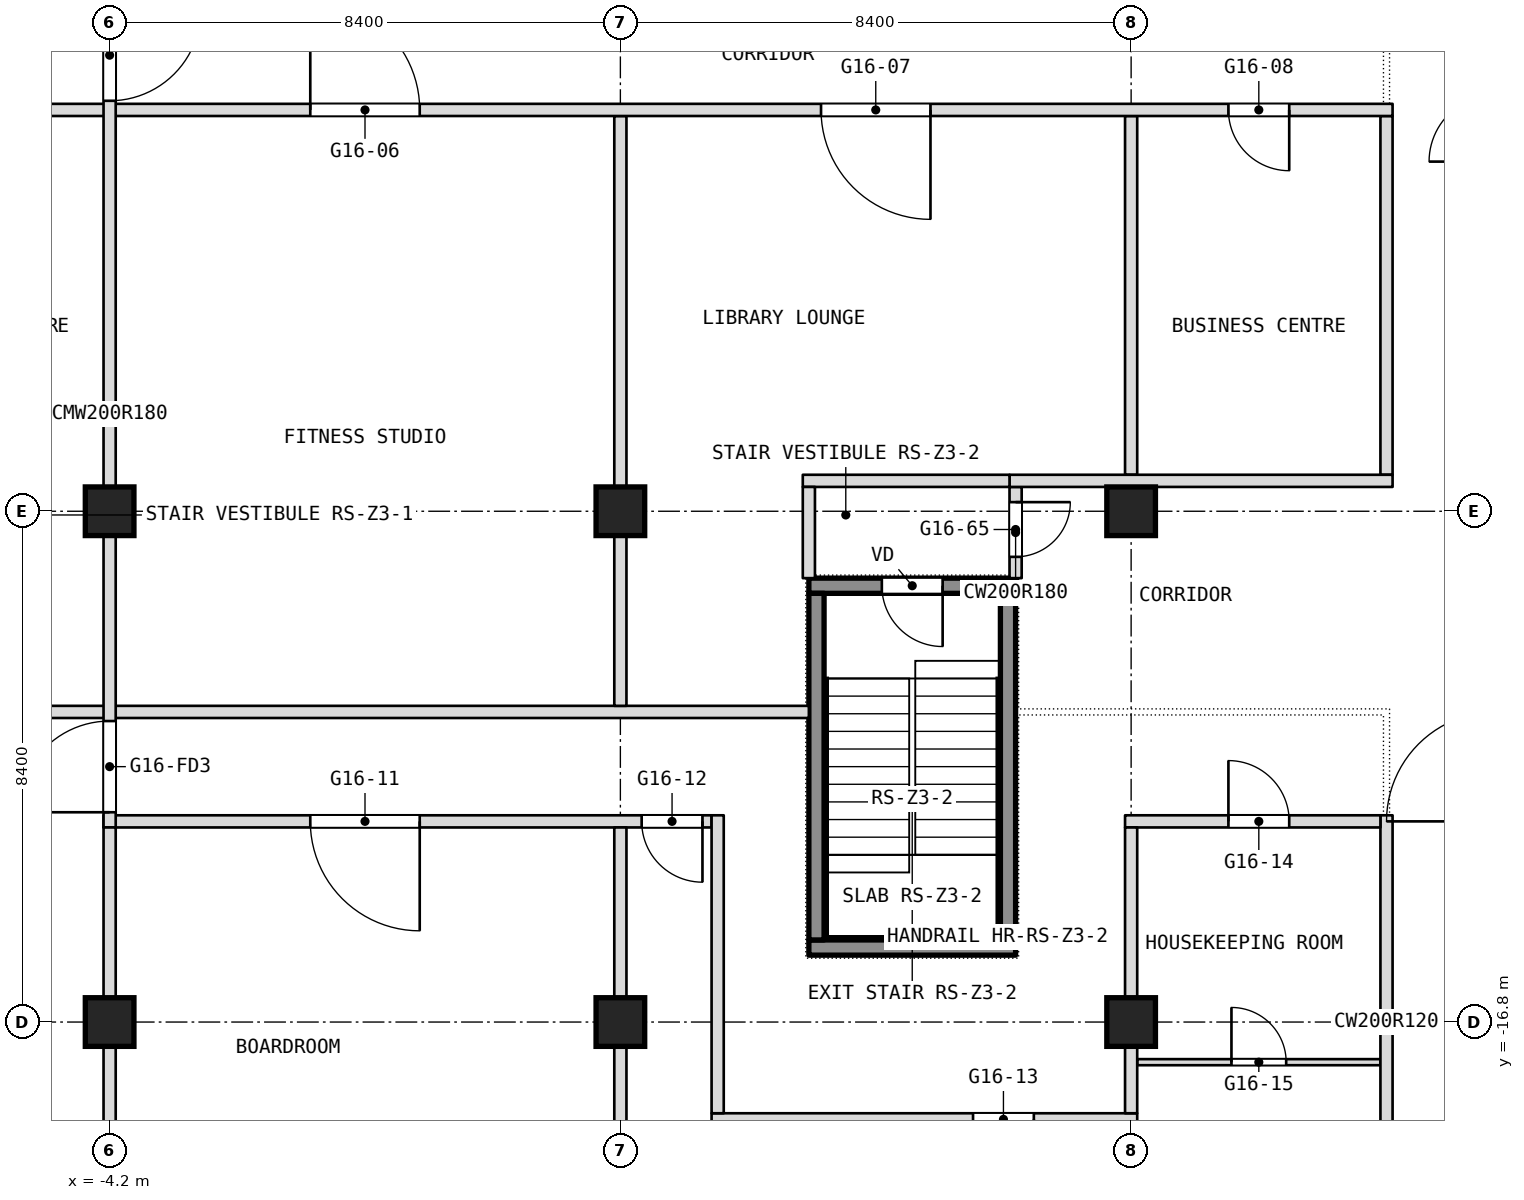
"""IFC4 building model, lengths in metres.
Left out: names, types, materials, properties, quantities, classifications, styles, units other than length and angle.
Written with IfcOpenShell. Run it as: python <this file> out.ifc"""

import sys

from ifc_helpers import new_model, si_unit, direction, frame, frame_2d, origin, origin_2d, place, context, subcontext, project, spatial, rectangle, extrude, element, fill, save


model = new_model("IFC4")
c1 = context("Model", 3, precision=1e-05, world=origin(), true_north=direction((0.0, 1.0)))
c2 = subcontext(c1, "Body", "Model", "MODEL_VIEW")
j1 = project(units=[si_unit("LENGTHUNIT", "METRE"), si_unit("PLANEANGLEUNIT", "RADIAN")], contexts=[c1])
p1 = place(None, origin())
s1 = spatial("IfcSite", under=j1, at=p1, CompositionType="ELEMENT")
p2 = place(p1, origin())
s2 = spatial("IfcBuilding", under=s1, at=p2, CompositionType="ELEMENT")
p3 = place(p2, frame((0.0, 0.0, 202.1)))
s3 = spatial("IfcBuildingStorey", under=s2, at=p3, CompositionType="ELEMENT", Elevation=202.1)
for number, where, z_axis, x_axis in (
    (1, (-4.2, -16.8, 0.0), (0.0, 0.0, 1.0), (1.0, 0.0, 0.0)),
    (2, (-4.2, -8.4, 0.0), (0.0, 0.0, 1.0), (1.0, 0.0, 0.0)),
    (3, (4.2, -16.8, 0.0), (0.0, 0.0, 1.0), (1.0, 0.0, 0.0)),
    (4, (4.2, -8.4, 0.0), (0.0, 0.0, 1.0), (1.0, 0.0, 0.0)),
    (5, (12.6, -16.8, 0.0), (0.0, 0.0, 1.0), (1.0, 0.0, 0.0)),
    (6, (12.6, -8.4, 0.0), (0.0, 0.0, 1.0), (1.0, 0.0, 0.0)),
):
    element("IfcColumn", number, at=place(p3, frame(where, z_axis=z_axis, x_axis=x_axis)), inside=s3, PredefinedType="COLUMN", context=c2, shape_type="SweptSolid", body=[
        extrude(rectangle(XDim=0.8, YDim=0.8, at=origin_2d()), origin(), (0.0, 0.0, 1.0), 3.6),
    ])
p4 = place(p3, frame((5.7, -18.4, 0.0), z_axis=(0.0, 0.0, 1.0), x_axis=(1.0, 0.0, 0.0)))
e7 = element("IfcWall", 7, at=p4, inside=s3, PredefinedType="PARTITIONING", context=c2, shape_type="SweptSolid", body=[
    extrude(rectangle(XDim=7.0, YDim=0.2, at=frame_2d((3.5, 0.0))), origin(), (0.0, 0.0, 1.0), 3.34),
])
p5 = place(p4, frame((4.3, 0.0, 0.0)))
e8 = element("IfcOpeningElement", 8, at=p5, cuts=e7, PredefinedType="OPENING", context=c2, shape_type="SweptSolid", body=[
    extrude(rectangle(XDim=1.0, YDim=2.1, at=frame_2d((0.5, 1.05))), frame((0.0, 0.1, 0.0), z_axis=(0.0, -1.0, 0.0), x_axis=(1.0, 0.0, 0.0)), (0.0, 0.0, 1.0), 0.2),
])
p6 = place(p3, frame((12.7, -17.46, 0.0), z_axis=(0.0, 0.0, 1.0), x_axis=(1.0, 0.0, 0.0)))
e9 = element("IfcWall", 9, at=p6, inside=s3, PredefinedType="PARTITIONING", context=c2, shape_type="SweptSolid", body=[
    extrude(rectangle(XDim=4.0, YDim=0.1, at=frame_2d((2.0, 0.0))), origin(), (0.0, 0.0, 1.0), 3.34),
])
p7 = place(p6, frame((1.55, 0.0, 0.0)))
e10 = element("IfcOpeningElement", 10, at=p7, cuts=e9, PredefinedType="OPENING", context=c2, shape_type="SweptSolid", body=[
    extrude(rectangle(XDim=0.9, YDim=2.1, at=frame_2d((0.45, 1.05))), frame((0.0, 0.05, 0.0), z_axis=(0.0, -1.0, 0.0), x_axis=(1.0, 0.0, 0.0)), (0.0, 0.0, 1.0), 0.1),
])
p8 = place(p3, frame((16.8, -20.2, 0.0), z_axis=(0.0, 0.0, 1.0), x_axis=(0.0, 1.0, 0.0)))
e11 = element("IfcWall", 11, at=p8, inside=s3, PredefinedType="PARTITIONING", context=c2, shape_type="SweptSolid", body=[
    extrude(rectangle(XDim=6.8, YDim=0.2, at=frame_2d((3.4, 0.0))), origin(), (0.0, 0.0, 1.0), 3.34),
])
p9 = place(p3, frame((16.8, -7.8, 0.0), z_axis=(0.0, 0.0, 1.0), x_axis=(0.0, 1.0, 0.0)))
e12 = element("IfcWall", 12, at=p9, inside=s3, PredefinedType="PARTITIONING", context=c2, shape_type="SweptSolid", body=[
    extrude(rectangle(XDim=5.9, YDim=0.2, at=frame_2d((2.95, 0.0))), origin(), (0.0, 0.0, 1.0), 3.34),
])
p10 = place(p3, frame((-4.3, -13.5, 0.0), z_axis=(0.0, 0.0, 1.0), x_axis=(1.0, 0.0, 0.0)))
e13 = element("IfcWall", 13, at=p10, inside=s3, PredefinedType="PARTITIONING", context=c2, shape_type="SweptSolid", body=[
    extrude(rectangle(XDim=10.0, YDim=0.2, at=frame_2d((5.0, 0.0))), origin(), (0.0, 0.0, 1.0), 3.34),
])
p11 = place(p10, frame((3.4, 0.0, 0.0)))
e14 = element("IfcOpeningElement", 14, at=p11, cuts=e13, PredefinedType="OPENING", context=c2, shape_type="SweptSolid", body=[
    extrude(rectangle(XDim=1.8, YDim=2.1, at=frame_2d((0.9, 1.05))), frame((0.0, 0.1, 0.0), z_axis=(0.0, -1.0, 0.0), x_axis=(1.0, 0.0, 0.0)), (0.0, 0.0, 1.0), 0.2),
])
p12 = place(p10, frame((8.85, 0.0, 0.0)))
e15 = element("IfcOpeningElement", 15, at=p12, cuts=e13, PredefinedType="OPENING", context=c2, shape_type="SweptSolid", body=[
    extrude(rectangle(XDim=1.0, YDim=2.1, at=frame_2d((0.5, 1.05))), frame((0.0, 0.1, 0.0), z_axis=(0.0, -1.0, 0.0), x_axis=(1.0, 0.0, 0.0)), (0.0, 0.0, 1.0), 0.2),
])
p13 = place(p3, frame((12.5, -13.5, 0.0), z_axis=(0.0, 0.0, 1.0), x_axis=(1.0, 0.0, 0.0)))
e16 = element("IfcWall", 16, at=p13, inside=s3, PredefinedType="PARTITIONING", context=c2, shape_type="SweptSolid", body=[
    extrude(rectangle(XDim=4.2, YDim=0.2, at=frame_2d((2.1, 0.0))), origin(), (0.0, 0.0, 1.0), 3.34),
])
p14 = place(p13, frame((1.7, 0.0, 0.0)))
e17 = element("IfcOpeningElement", 17, at=p14, cuts=e16, PredefinedType="OPENING", context=c2, shape_type="SweptSolid", body=[
    extrude(rectangle(XDim=1.0, YDim=2.1, at=frame_2d((0.5, 1.05))), frame((0.0, 0.1, 0.0), z_axis=(0.0, -1.0, 0.0), x_axis=(1.0, 0.0, 0.0)), (0.0, 0.0, 1.0), 0.2),
])
p15 = place(p3, frame((12.6, -7.8, 0.0), z_axis=(0.0, 0.0, 1.0), x_axis=(0.0, 1.0, 0.0)))
e18 = element("IfcWall", 18, at=p15, inside=s3, PredefinedType="PARTITIONING", context=c2, shape_type="SweptSolid", body=[
    extrude(rectangle(XDim=5.9, YDim=0.2, at=frame_2d((2.95, 0.0))), origin(), (0.0, 0.0, 1.0), 3.34),
])
p16 = place(p3, frame((12.6, -18.3, 0.0), z_axis=(0.0, 0.0, 1.0), x_axis=(0.0, 1.0, 0.0)))
e19 = element("IfcWall", 19, at=p16, inside=s3, PredefinedType="PARTITIONING", context=c2, shape_type="SweptSolid", body=[
    extrude(rectangle(XDim=4.7, YDim=0.2, at=frame_2d((2.35, 0.0))), origin(), (0.0, 0.0, 1.0), 3.34),
])
p17 = place(p3, frame((-7.3, -11.7, 0.0), z_axis=(0.0, 0.0, 1.0), x_axis=(1.0, 0.0, 0.0)))
e20 = element("IfcWall", 20, at=p17, inside=s3, PredefinedType="PARTITIONING", context=c2, shape_type="SweptSolid", body=[
    extrude(rectangle(XDim=14.6, YDim=0.2, at=frame_2d((7.3, 0.0))), origin(), (0.0, 0.0, 1.0), 3.34),
])
p18 = place(p3, frame((10.7, -9.5, 0.0), z_axis=(0.0, 0.0, 1.0), x_axis=(0.0, 1.0, 0.0)))
e21 = element("IfcWall", 21, at=p18, inside=s3, PredefinedType="PARTITIONING", context=c2, shape_type="SweptSolid", body=[
    extrude(rectangle(XDim=1.5, YDim=0.2, at=frame_2d((0.75, 0.0))), origin(), (0.0, 0.0, 1.0), 3.34),
])
p19 = place(p18, frame((0.35, 0.0, 0.0)))
e22 = element("IfcOpeningElement", 22, at=p19, cuts=e21, PredefinedType="OPENING", context=c2, shape_type="SweptSolid", body=[
    extrude(rectangle(XDim=0.9, YDim=2.1, at=frame_2d((0.45, 1.05))), frame((0.0, 0.1, 0.0), z_axis=(0.0, -1.0, 0.0), x_axis=(1.0, 0.0, 0.0)), (0.0, 0.0, 1.0), 0.2),
])
p20 = place(p3, frame((10.6, -7.9, 0.0), z_axis=(0.0, 0.0, 1.0), x_axis=(1.0, 0.0, 0.0)))
e23 = element("IfcWall", 23, at=p20, inside=s3, PredefinedType="PARTITIONING", context=c2, shape_type="SweptSolid", body=[
    extrude(rectangle(XDim=6.3, YDim=0.2, at=frame_2d((3.15, 0.0))), origin(), (0.0, 0.0, 1.0), 3.34),
])
p21 = place(p3, frame((7.2, -7.9, 0.0), z_axis=(0.0, 0.0, 1.0), x_axis=(1.0, 0.0, 0.0)))
e24 = element("IfcWall", 24, at=p21, inside=s3, PredefinedType="PARTITIONING", context=c2, shape_type="SweptSolid", body=[
    extrude(rectangle(XDim=3.4, YDim=0.2, at=frame_2d((1.7, 0.0))), origin(), (0.0, 0.0, 1.0), 3.34),
])
p22 = place(p3, frame((7.3, -9.5, 0.0), z_axis=(0.0, 0.0, 1.0), x_axis=(0.0, 1.0, 0.0)))
e25 = element("IfcWall", 25, at=p22, inside=s3, PredefinedType="PARTITIONING", context=c2, shape_type="SweptSolid", body=[
    extrude(rectangle(XDim=1.5, YDim=0.2, at=frame_2d((0.75, 0.0))), origin(), (0.0, 0.0, 1.0), 3.34),
])
p23 = place(p3, frame((5.8, -18.3, 0.0), z_axis=(0.0, 0.0, 1.0), x_axis=(0.0, 1.0, 0.0)))
e26 = element("IfcWall", 26, at=p23, inside=s3, PredefinedType="PARTITIONING", context=c2, shape_type="SweptSolid", body=[
    extrude(rectangle(XDim=4.9, YDim=0.2, at=frame_2d((2.45, 0.0))), origin(), (0.0, 0.0, 1.0), 3.34),
])
p24 = place(p3, frame((4.2, -20.0, 0.0), z_axis=(0.0, 0.0, 1.0), x_axis=(0.0, 1.0, 0.0)))
e27 = element("IfcWall", 27, at=p24, inside=s3, PredefinedType="PARTITIONING", context=c2, shape_type="SweptSolid", body=[
    extrude(rectangle(XDim=6.4, YDim=0.2, at=frame_2d((3.2, 0.0))), origin(), (0.0, 0.0, 1.0), 3.34),
])
p25 = place(p3, frame((4.2, -11.6, 0.0), z_axis=(0.0, 0.0, 1.0), x_axis=(0.0, 1.0, 0.0)))
e28 = element("IfcWall", 28, at=p25, inside=s3, PredefinedType="PARTITIONING", context=c2, shape_type="SweptSolid", body=[
    extrude(rectangle(XDim=9.7, YDim=0.2, at=frame_2d((4.85, 0.0))), origin(), (0.0, 0.0, 1.0), 3.34),
])
p26 = place(p3, frame((-16.9, -1.8, 0.0), z_axis=(0.0, 0.0, 1.0), x_axis=(1.0, 0.0, 0.0)))
e29 = element("IfcWall", 29, at=p26, inside=s3, PredefinedType="PARTITIONING", context=c2, shape_type="SweptSolid", body=[
    extrude(rectangle(XDim=33.8, YDim=0.2, at=frame_2d((16.9, 0.0))), origin(), (0.0, 0.0, 1.0), 3.34),
])
p27 = place(p26, frame((1.7, 0.0, 0.0)))
e30 = element("IfcOpeningElement", 30, at=p27, cuts=e29, PredefinedType="OPENING", context=c2, shape_type="SweptSolid", body=[
    extrude(rectangle(XDim=1.0, YDim=2.1, at=frame_2d((0.5, 1.05))), frame((0.0, 0.1, 0.0), z_axis=(0.0, -1.0, 0.0), x_axis=(1.0, 0.0, 0.0)), (0.0, 0.0, 1.0), 0.2),
])
p28 = place(p26, frame((5.9, 0.0, 0.0)))
e31 = element("IfcOpeningElement", 31, at=p28, cuts=e29, PredefinedType="OPENING", context=c2, shape_type="SweptSolid", body=[
    extrude(rectangle(XDim=1.0, YDim=2.1, at=frame_2d((0.5, 1.05))), frame((0.0, 0.1, 0.0), z_axis=(0.0, -1.0, 0.0), x_axis=(1.0, 0.0, 0.0)), (0.0, 0.0, 1.0), 0.2),
])
p29 = place(p26, frame((10.1, 0.0, 0.0)))
e32 = element("IfcOpeningElement", 32, at=p29, cuts=e29, PredefinedType="OPENING", context=c2, shape_type="SweptSolid", body=[
    extrude(rectangle(XDim=1.0, YDim=2.1, at=frame_2d((0.5, 1.05))), frame((0.0, 0.1, 0.0), z_axis=(0.0, -1.0, 0.0), x_axis=(1.0, 0.0, 0.0)), (0.0, 0.0, 1.0), 0.2),
])
p30 = place(p26, frame((16.0, 0.0, 0.0)))
e33 = element("IfcOpeningElement", 33, at=p30, cuts=e29, PredefinedType="OPENING", context=c2, shape_type="SweptSolid", body=[
    extrude(rectangle(XDim=1.8, YDim=2.1, at=frame_2d((0.9, 1.05))), frame((0.0, 0.1, 0.0), z_axis=(0.0, -1.0, 0.0), x_axis=(1.0, 0.0, 0.0)), (0.0, 0.0, 1.0), 0.2),
])
p31 = place(p26, frame((24.4, 0.0, 0.0)))
e34 = element("IfcOpeningElement", 34, at=p31, cuts=e29, PredefinedType="OPENING", context=c2, shape_type="SweptSolid", body=[
    extrude(rectangle(XDim=1.8, YDim=2.1, at=frame_2d((0.9, 1.05))), frame((0.0, 0.1, 0.0), z_axis=(0.0, -1.0, 0.0), x_axis=(1.0, 0.0, 0.0)), (0.0, 0.0, 1.0), 0.2),
])
p32 = place(p26, frame((31.1, 0.0, 0.0)))
e35 = element("IfcOpeningElement", 35, at=p32, cuts=e29, PredefinedType="OPENING", context=c2, shape_type="SweptSolid", body=[
    extrude(rectangle(XDim=1.0, YDim=2.1, at=frame_2d((0.5, 1.05))), frame((0.0, 0.1, 0.0), z_axis=(0.0, -1.0, 0.0), x_axis=(1.0, 0.0, 0.0)), (0.0, 0.0, 1.0), 0.2),
])
p33 = place(p3, frame((-4.2, -13.6, 0.0), z_axis=(0.0, 0.0, 1.0), x_axis=(0.0, 1.0, 0.0)))
e36 = element("IfcWall", 36, at=p33, inside=s3, PredefinedType="PARTITIONING", context=c2, shape_type="SweptSolid", body=[
    extrude(rectangle(XDim=13.6, YDim=0.2, at=frame_2d((6.8, 0.0))), origin(), (0.0, 0.0, 1.0), 3.34),
])
p34 = place(p33, frame((11.95, 0.0, 0.0)))
e37 = element("IfcOpeningElement", 37, at=p34, cuts=e36, PredefinedType="OPENING", context=c2, shape_type="SweptSolid", body=[
    extrude(rectangle(XDim=1.5, YDim=2.1, at=frame_2d((0.75, 1.05))), frame((0.0, 0.1, 0.0), z_axis=(0.0, -1.0, 0.0), x_axis=(1.0, 0.0, 0.0)), (0.0, 0.0, 1.0), 0.2),
])
p35 = place(p33, frame((0.25, 0.0, 0.0)))
e38 = element("IfcOpeningElement", 38, at=p35, cuts=e36, PredefinedType="OPENING", context=c2, shape_type="SweptSolid", body=[
    extrude(rectangle(XDim=1.5, YDim=2.1, at=frame_2d((0.75, 1.05))), frame((0.0, 0.1, 0.0), z_axis=(0.0, -1.0, 0.0), x_axis=(1.0, 0.0, 0.0)), (0.0, 0.0, 1.0), 0.2),
])
p36 = place(p3, frame((-4.2, -22.0, 0.0), z_axis=(0.0, 0.0, 1.0), x_axis=(0.0, 1.0, 0.0)))
e39 = element("IfcWall", 39, at=p36, inside=s3, PredefinedType="PARTITIONING", context=c2, shape_type="SweptSolid", body=[
    extrude(rectangle(XDim=8.4, YDim=0.2, at=frame_2d((4.2, 0.0))), origin(), (0.0, 0.0, 1.0), 3.34),
])
p37 = place(p36, frame((0.225, 0.0, 0.0)))
e40 = element("IfcOpeningElement", 40, at=p37, cuts=e39, PredefinedType="OPENING", context=c2, shape_type="SweptSolid", body=[
    extrude(rectangle(XDim=1.5, YDim=2.1, at=frame_2d((0.75, 1.05))), frame((0.0, 0.1, 0.0), z_axis=(0.0, -1.0, 0.0), x_axis=(1.0, 0.0, 0.0)), (0.0, 0.0, 1.0), 0.2),
])
p38 = place(p3, frame((7.3, -15.575, 0.1), z_axis=(0.0, 0.0, 1.0), x_axis=(1.0, 0.0, 0.0)))
e41 = element("IfcWall", 41, at=p38, inside=s3, PredefinedType="SHEAR", context=c2, shape_type="SweptSolid", body=[
    extrude(rectangle(XDim=3.4, YDim=0.25, at=frame_2d((1.7, 0.0))), origin(), (0.0, 0.0, 1.0), 3.6),
])
p39 = place(p3, frame((7.3, -9.625, 0.1), z_axis=(0.0, 0.0, 1.0), x_axis=(1.0, 0.0, 0.0)))
e42 = element("IfcWall", 42, at=p39, inside=s3, PredefinedType="SHEAR", context=c2, shape_type="SweptSolid", body=[
    extrude(rectangle(XDim=3.4, YDim=0.25, at=frame_2d((1.7, 0.0))), origin(), (0.0, 0.0, 1.0), 3.6),
])
p40 = place(p39, frame((1.2, 0.0, 0.0)))
e43 = element("IfcOpeningElement", 43, at=p40, cuts=e42, PredefinedType="OPENING", context=c2, shape_type="SweptSolid", body=[
    extrude(rectangle(XDim=1.0, YDim=2.1, at=frame_2d((0.5, 1.05))), frame((0.0, 0.125, 0.0), z_axis=(0.0, -1.0, 0.0), x_axis=(1.0, 0.0, 0.0)), (0.0, 0.0, 1.0), 0.25),
])
for number, where, z_axis, x_axis in (
    (44, (7.425, -15.45, 0.1), (0.0, 0.0, 1.0), (0.0, 1.0, 0.0)),
    (45, (10.575, -15.45, 0.1), (0.0, 0.0, 1.0), (0.0, 1.0, 0.0)),
):
    element("IfcWall", number, at=place(p3, frame(where, z_axis=z_axis, x_axis=x_axis)), inside=s3, PredefinedType="SHEAR", context=c2, shape_type="SweptSolid", body=[
        extrude(rectangle(XDim=5.7, YDim=0.25, at=frame_2d((2.85, 0.0))), origin(), (0.0, 0.0, 1.0), 3.6),
    ])
p41 = place(p5, origin())
e46 = element("IfcDoor", 46, at=p41, inside=s3, OperationType="SINGLE_SWING_RIGHT", PredefinedType="DOOR", context=c2, shape_type="SweptSolid", body=[
    extrude(rectangle(XDim=1.0, YDim=2.1, at=frame_2d((0.5, 1.05))), frame((0.0, 0.025, 0.0), z_axis=(0.0, -1.0, 0.0), x_axis=(1.0, 0.0, 0.0)), (0.0, 0.0, 1.0), 0.05),
])
fill(e8, e46)
p42 = place(p7, origin())
e47 = element("IfcDoor", 47, at=p42, inside=s3, OperationType="SINGLE_SWING_RIGHT", PredefinedType="DOOR", context=c2, shape_type="SweptSolid", body=[
    extrude(rectangle(XDim=0.9, YDim=2.1, at=frame_2d((0.45, 1.05))), frame((0.0, 0.025, 0.0), z_axis=(0.0, -1.0, 0.0), x_axis=(1.0, 0.0, 0.0)), (0.0, 0.0, 1.0), 0.05),
])
fill(e10, e47)
p43 = place(p11, origin())
e48 = element("IfcDoor", 48, at=p43, inside=s3, OperationType="DOUBLE_DOOR_SINGLE_SWING", PredefinedType="DOOR", context=c2, shape_type="SweptSolid", body=[
    extrude(rectangle(XDim=1.8, YDim=2.1, at=frame_2d((0.9, 1.05))), frame((0.0, 0.025, 0.0), z_axis=(0.0, -1.0, 0.0), x_axis=(1.0, 0.0, 0.0)), (0.0, 0.0, 1.0), 0.05),
])
fill(e14, e48)
p44 = place(p12, origin())
e49 = element("IfcDoor", 49, at=p44, inside=s3, OperationType="SINGLE_SWING_LEFT", PredefinedType="DOOR", context=c2, shape_type="SweptSolid", body=[
    extrude(rectangle(XDim=1.0, YDim=2.1, at=frame_2d((0.5, 1.05))), frame((0.0, 0.025, 0.0), z_axis=(0.0, -1.0, 0.0), x_axis=(1.0, 0.0, 0.0)), (0.0, 0.0, 1.0), 0.05),
])
fill(e15, e49)
p45 = place(p14, origin())
e50 = element("IfcDoor", 50, at=p45, inside=s3, OperationType="SINGLE_SWING_RIGHT", PredefinedType="DOOR", context=c2, shape_type="SweptSolid", body=[
    extrude(rectangle(XDim=1.0, YDim=2.1, at=frame_2d((0.5, 1.05))), frame((0.0, 0.025, 0.0), z_axis=(0.0, -1.0, 0.0), x_axis=(1.0, 0.0, 0.0)), (0.0, 0.0, 1.0), 0.05),
])
fill(e17, e50)
p46 = place(p19, origin())
e51 = element("IfcDoor", 51, at=p46, inside=s3, OperationType="SINGLE_SWING_RIGHT", PredefinedType="DOOR", context=c2, shape_type="SweptSolid", body=[
    extrude(rectangle(XDim=0.9, YDim=2.1, at=frame_2d((0.45, 1.05))), frame((0.0, 0.025, 0.0), z_axis=(0.0, -1.0, 0.0), x_axis=(1.0, 0.0, 0.0)), (0.0, 0.0, 1.0), 0.05),
])
fill(e22, e51)
p47 = place(p30, origin())
e52 = element("IfcDoor", 52, at=p47, inside=s3, OperationType="DOUBLE_DOOR_SINGLE_SWING", PredefinedType="DOOR", context=c2, shape_type="SweptSolid", body=[
    extrude(rectangle(XDim=1.8, YDim=2.1, at=frame_2d((0.9, 1.05))), frame((0.0, 0.025, 0.0), z_axis=(0.0, -1.0, 0.0), x_axis=(1.0, 0.0, 0.0)), (0.0, 0.0, 1.0), 0.05),
])
fill(e33, e52)
p48 = place(p31, origin())
e53 = element("IfcDoor", 53, at=p48, inside=s3, OperationType="DOUBLE_DOOR_SINGLE_SWING", PredefinedType="DOOR", context=c2, shape_type="SweptSolid", body=[
    extrude(rectangle(XDim=1.8, YDim=2.1, at=frame_2d((0.9, 1.05))), frame((0.0, 0.025, 0.0), z_axis=(0.0, -1.0, 0.0), x_axis=(1.0, 0.0, 0.0)), (0.0, 0.0, 1.0), 0.05),
])
fill(e34, e53)
p49 = place(p32, origin())
e54 = element("IfcDoor", 54, at=p49, inside=s3, OperationType="SINGLE_SWING_LEFT", PredefinedType="DOOR", context=c2, shape_type="SweptSolid", body=[
    extrude(rectangle(XDim=1.0, YDim=2.1, at=frame_2d((0.5, 1.05))), frame((0.0, 0.025, 0.0), z_axis=(0.0, -1.0, 0.0), x_axis=(1.0, 0.0, 0.0)), (0.0, 0.0, 1.0), 0.05),
])
fill(e35, e54)
p50 = place(p40, origin())
e55 = element("IfcDoor", 55, at=p50, inside=s3, OperationType="SINGLE_SWING_LEFT", PredefinedType="DOOR", context=c2, shape_type="SweptSolid", body=[
    extrude(rectangle(XDim=1.0, YDim=2.1, at=frame_2d((0.5, 1.05))), frame((0.0, 0.025, 0.0), z_axis=(0.0, -1.0, 0.0), x_axis=(1.0, 0.0, 0.0)), (0.0, 0.0, 1.0), 0.05),
])
fill(e43, e55)
p51 = place(p34, origin())
e56 = element("IfcDoor", 56, at=p51, inside=s3, OperationType="DOUBLE_DOOR_DOUBLE_SWING", PredefinedType="DOOR", context=c2, shape_type="SweptSolid", body=[
    extrude(rectangle(XDim=1.5, YDim=2.1, at=frame_2d((0.75, 1.05))), frame((0.0, 0.025, 0.0), z_axis=(0.0, -1.0, 0.0), x_axis=(1.0, 0.0, 0.0)), (0.0, 0.0, 1.0), 0.05),
])
fill(e37, e56)
p52 = place(p35, origin())
e57 = element("IfcDoor", 57, at=p52, inside=s3, OperationType="DOUBLE_DOOR_DOUBLE_SWING", PredefinedType="DOOR", context=c2, shape_type="SweptSolid", body=[
    extrude(rectangle(XDim=1.5, YDim=2.1, at=frame_2d((0.75, 1.05))), frame((0.0, 0.025, 0.0), z_axis=(0.0, -1.0, 0.0), x_axis=(1.0, 0.0, 0.0)), (0.0, 0.0, 1.0), 0.05),
])
fill(e38, e57)
save(model, sys.argv[1])
